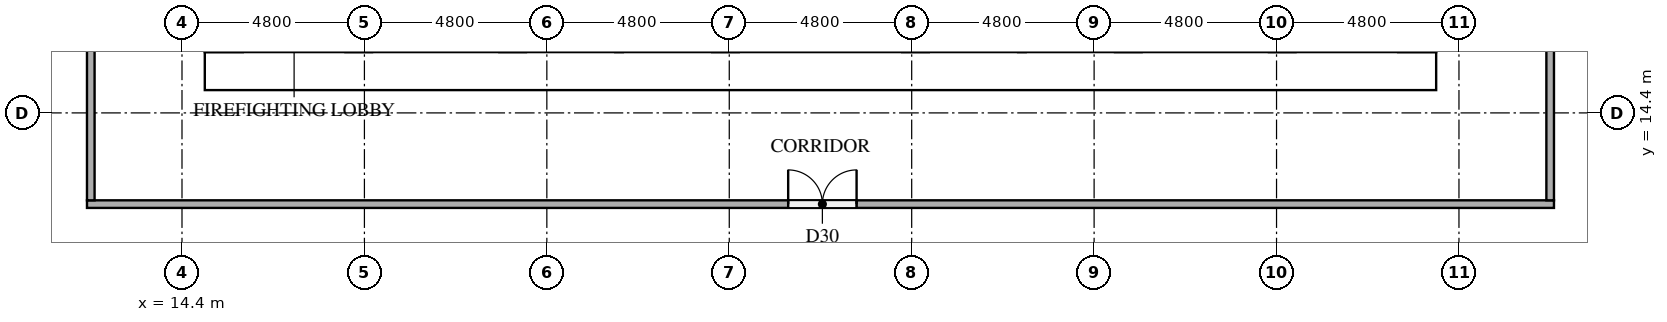
"""IFC4 building model, lengths in metres.
Left out: names, types, materials, properties, quantities, classifications, styles, units other than length and angle.
Written with IfcOpenShell. Run it as: python <this file> out.ifc"""

import sys

from ifc_helpers import new_model, si_unit, direction, frame, frame_2d, origin, place, context, subcontext, project, spatial, rectangle, extrude, element, fill, save


model = new_model("IFC4")
c1 = context("Model", 3, precision=1e-05, world=origin(), true_north=direction((0.0, 1.0)))
c2 = subcontext(c1, "Body", "Model", "MODEL_VIEW")
j1 = project(units=[si_unit("LENGTHUNIT", "METRE"), si_unit("PLANEANGLEUNIT", "RADIAN")], contexts=[c1])
p1 = place(None, origin())
s1 = spatial("IfcSite", under=j1, at=p1, CompositionType="ELEMENT")
p2 = place(p1, origin())
s2 = spatial("IfcBuilding", under=s1, at=p2, CompositionType="ELEMENT")
p3 = place(p2, frame((0.0, 0.0, 6.0)))
s3 = spatial("IfcBuildingStorey", under=s2, at=p3, CompositionType="ELEMENT", Elevation=6.0)
p4 = place(p3, frame((15.0, 15.5, 0.0), z_axis=(0.0, 0.0, 1.0), x_axis=(1.0, 0.0, 0.0)))
e1 = element("IfcWall", 1, at=p4, inside=s3, PredefinedType="SHEAR", context=c2, shape_type="SweptSolid", body=[
    extrude(rectangle(XDim=32.4, YDim=1.0, at=frame_2d((16.2, 0.0))), origin(), (0.0, 0.0, 1.0), 4.2),
])
p5 = place(p4, frame((15.3, 0.0, 0.0)))
e2 = element("IfcOpeningElement", 2, at=p5, cuts=e1, PredefinedType="OPENING", context=c2, shape_type="SweptSolid", body=[
    extrude(rectangle(XDim=1.8, YDim=2.1, at=frame_2d((0.9, 1.05))), frame((0.0, 0.51, 0.0), z_axis=(0.0, -1.0, 0.0), x_axis=(1.0, 0.0, 0.0)), (0.0, 0.0, 1.0), 1.02),
])
p6 = place(p3, frame((15.5, 16.0, 0.0), z_axis=(0.0, 0.0, 1.0), x_axis=(0.0, 1.0, 0.0)))
e3 = element("IfcWall", 3, at=p6, inside=s3, PredefinedType="SHEAR", context=c2, shape_type="SweptSolid", body=[
    extrude(rectangle(XDim=20.8, YDim=1.0, at=frame_2d((10.4, 0.0))), origin(), (0.0, 0.0, 1.0), 4.2),
])
p7 = place(p6, frame((4.76, 0.0, 0.0)))
e4 = element("IfcOpeningElement", 4, at=p7, cuts=e3, PredefinedType="OPENING", context=c2, shape_type="SweptSolid", body=[
    extrude(rectangle(XDim=1.2, YDim=2.1, at=frame_2d((0.6, 1.05))), frame((0.0, 0.51, 0.0), z_axis=(0.0, -1.0, 0.0), x_axis=(1.0, 0.0, 0.0)), (0.0, 0.0, 1.0), 1.02),
])
p8 = place(p3, frame((46.9, 16.0, 0.0), z_axis=(0.0, 0.0, 1.0), x_axis=(0.0, 1.0, 0.0)))
e5 = element("IfcWall", 5, at=p8, inside=s3, PredefinedType="SHEAR", context=c2, shape_type="SweptSolid", body=[
    extrude(rectangle(XDim=20.8, YDim=1.0, at=frame_2d((10.4, 0.0))), origin(), (0.0, 0.0, 1.0), 4.2),
])
p9 = place(p8, frame((10.1, 0.0, 0.0)))
e6 = element("IfcOpeningElement", 6, at=p9, cuts=e5, PredefinedType="OPENING", context=c2, shape_type="SweptSolid", body=[
    extrude(rectangle(XDim=1.2, YDim=2.1, at=frame_2d((0.6, 1.05))), frame((0.0, 0.51, 0.0), z_axis=(0.0, -1.0, 0.0), x_axis=(1.0, 0.0, 0.0)), (0.0, 0.0, 1.0), 1.02),
])
p10 = place(p3, frame((23.1, 16.0, 0.0), z_axis=(0.0, 0.0, 1.0), x_axis=(0.0, 1.0, 0.0)))
e7 = element("IfcWall", 7, at=p10, inside=s3, PredefinedType="SHEAR", context=c2, shape_type="SweptSolid", body=[
    extrude(rectangle(XDim=20.8, YDim=0.7, at=frame_2d((10.4, 0.0))), origin(), (0.0, 0.0, 1.0), 4.2),
])
p11 = place(p3, frame((11.9, 12.0, 0.0), z_axis=(0.0, 0.0, 1.0), x_axis=(1.0, 0.0, 0.0)))
e8 = element("IfcWall", 8, at=p11, inside=s3, PredefinedType="PARTITIONING", context=c2, shape_type="SweptSolid", body=[
    extrude(rectangle(XDim=38.6, YDim=0.2, at=frame_2d((19.3, 0.0))), origin(), (0.0, 0.0, 1.0), 4.2),
])
p12 = place(p11, frame((18.45, 0.0, 0.0)))
e9 = element("IfcOpeningElement", 9, at=p12, cuts=e8, PredefinedType="OPENING", context=c2, shape_type="SweptSolid", body=[
    extrude(rectangle(XDim=1.8, YDim=2.1, at=frame_2d((0.9, 1.05))), frame((0.0, 0.11, 0.0), z_axis=(0.0, -1.0, 0.0), x_axis=(1.0, 0.0, 0.0)), (0.0, 0.0, 1.0), 0.22),
])
p13 = place(p3, frame((12.0, 40.7, 0.0), z_axis=(0.0, 0.0, 1.0), x_axis=(0.0, -1.0, 0.0)))
e10 = element("IfcWall", 10, at=p13, inside=s3, PredefinedType="PARTITIONING", context=c2, shape_type="SweptSolid", body=[
    extrude(rectangle(XDim=28.6, YDim=0.2, at=frame_2d((14.3, 0.0))), origin(), (0.0, 0.0, 1.0), 4.2),
])
p14 = place(p13, frame((6.85, 0.0, 0.0)))
e11 = element("IfcOpeningElement", 11, at=p14, cuts=e10, PredefinedType="OPENING", context=c2, shape_type="SweptSolid", body=[
    extrude(rectangle(XDim=1.8, YDim=2.1, at=frame_2d((0.9, 1.05))), frame((0.0, 0.11, 0.0), z_axis=(0.0, -1.0, 0.0), x_axis=(1.0, 0.0, 0.0)), (0.0, 0.0, 1.0), 0.22),
])
p15 = place(p3, frame((50.4, 12.1, 0.0), z_axis=(0.0, 0.0, 1.0), x_axis=(0.0, 1.0, 0.0)))
e12 = element("IfcWall", 12, at=p15, inside=s3, PredefinedType="PARTITIONING", context=c2, shape_type="SweptSolid", body=[
    extrude(rectangle(XDim=28.6, YDim=0.2, at=frame_2d((14.3, 0.0))), origin(), (0.0, 0.0, 1.0), 4.2),
])
p16 = place(p15, frame((20.05, 0.0, 0.0)))
e13 = element("IfcOpeningElement", 13, at=p16, cuts=e12, PredefinedType="OPENING", context=c2, shape_type="SweptSolid", body=[
    extrude(rectangle(XDim=1.8, YDim=2.1, at=frame_2d((0.9, 1.05))), frame((0.0, 0.11, 0.0), z_axis=(0.0, -1.0, 0.0), x_axis=(1.0, 0.0, 0.0)), (0.0, 0.0, 1.0), 0.22),
])
p17 = place(p5, frame((1.8, 0.0, 0.0), z_axis=(0.0, 0.0, 1.0), x_axis=(-1.0, 0.0, 0.0)))
e14 = element("IfcDoor", 14, at=p17, inside=s3, OperationType="DOUBLE_DOOR_SINGLE_SWING", PredefinedType="DOOR", context=c2, shape_type="SweptSolid", body=[
    extrude(rectangle(XDim=1.8, YDim=2.1, at=frame_2d((0.9, 1.05))), frame((0.0, 0.025, 0.0), z_axis=(0.0, -1.0, 0.0), x_axis=(1.0, 0.0, 0.0)), (0.0, 0.0, 1.0), 0.05),
])
fill(e2, e14)
p18 = place(p12, origin())
e15 = element("IfcDoor", 15, at=p18, inside=s3, OperationType="DOUBLE_DOOR_SINGLE_SWING", PredefinedType="DOOR", context=c2, shape_type="SweptSolid", body=[
    extrude(rectangle(XDim=1.8, YDim=2.1, at=frame_2d((0.9, 1.05))), frame((0.0, 0.025, 0.0), z_axis=(0.0, -1.0, 0.0), x_axis=(1.0, 0.0, 0.0)), (0.0, 0.0, 1.0), 0.05),
])
fill(e9, e15)
save(model, sys.argv[1])
